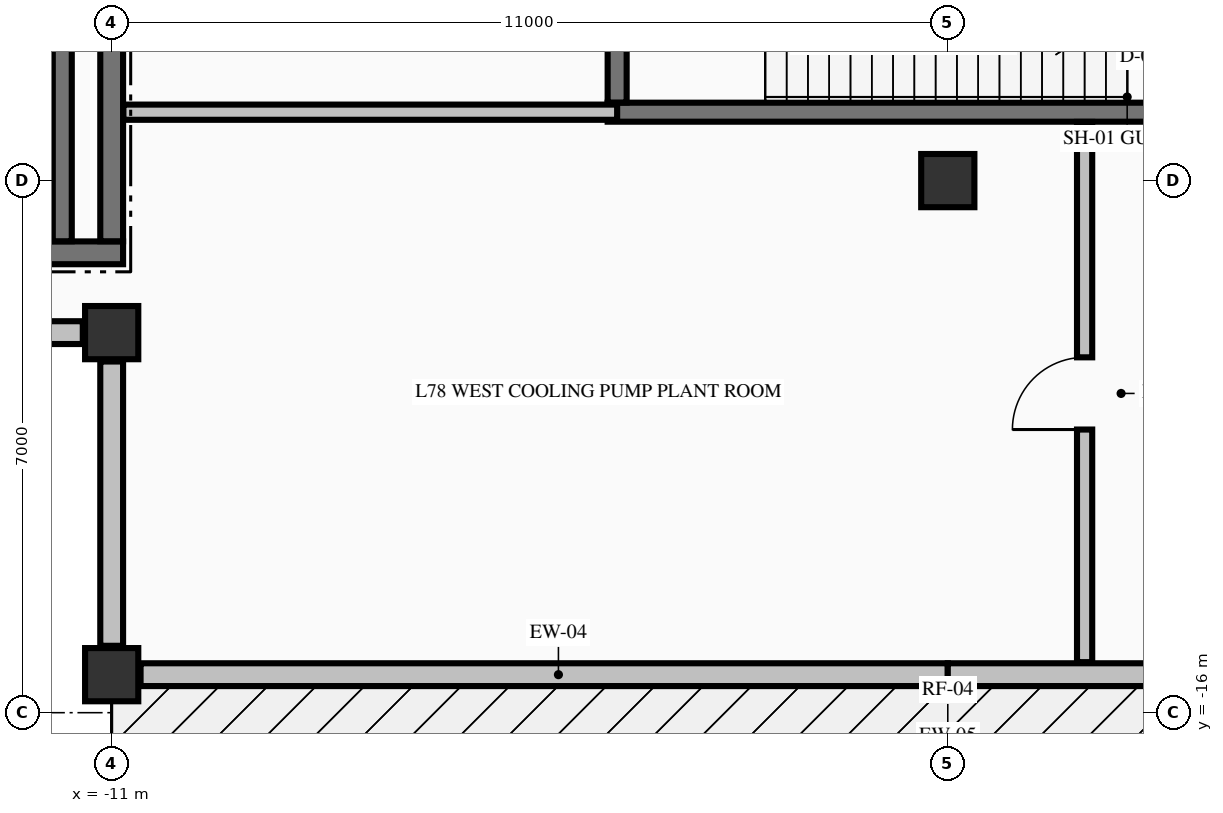
"""IFC4 building model, lengths in metres.
Left out: names, types, materials, properties, quantities, classifications, styles, units other than length and angle.
Written with IfcOpenShell. Run it as: python <this file> out.ifc"""

import sys

from ifc_helpers import new_model, si_unit, direction, frame, frame_2d, origin, origin_2d, place, context, subcontext, project, spatial, rectangle, extrude, element, fill, save


model = new_model("IFC4")
c1 = context("Model", 3, precision=1e-05, world=origin(), true_north=direction((0.0, 1.0)))
c2 = subcontext(c1, "Body", "Model", "MODEL_VIEW")
j1 = project(units=[si_unit("LENGTHUNIT", "METRE"), si_unit("PLANEANGLEUNIT", "RADIAN")], contexts=[c1])
p1 = place(None, origin())
s1 = spatial("IfcSite", under=j1, at=p1, CompositionType="ELEMENT")
p2 = place(p1, origin())
s2 = spatial("IfcBuilding", under=s1, at=p2, CompositionType="ELEMENT")
p3 = place(p2, frame((0.0, 0.0, 290.98)))
s3 = spatial("IfcBuildingStorey", under=s2, at=p3, CompositionType="ELEMENT", Elevation=290.98)
for number, where, z_axis, x_axis in (
    (1, (-11.0, -15.5, -0.325), (0.0, 0.0, 1.0), (1.0, 0.0, 0.0)),
    (2, (-11.0, -11.0, -0.325), (0.0, 0.0, 1.0), (1.0, 0.0, 0.0)),
    (3, (0.0, -9.0, -0.325), (0.0, 0.0, 1.0), (1.0, 0.0, 0.0)),
):
    element("IfcColumn", number, at=place(p3, frame(where, z_axis=z_axis, x_axis=x_axis)), inside=s3, PredefinedType="COLUMN", context=c2, shape_type="SweptSolid", body=[
        extrude(rectangle(XDim=0.7, YDim=0.7, at=origin_2d()), origin(), (0.0, 0.0, 1.0), 3.06),
    ])
for number, where, z_axis, x_axis in (
    (4, (-10.62, -15.5, 0.0), (0.0, 0.0, 1.0), (1.0, 0.0, 0.0)),
    (5, (0.0, -15.5, 0.0), (0.0, 0.0, 1.0), (1.0, 0.0, 0.0)),
):
    element("IfcWall", number, at=place(p3, frame(where, z_axis=z_axis, x_axis=x_axis)), inside=s3, PredefinedType="STANDARD", context=c2, shape_type="SweptSolid", body=[
        extrude(rectangle(XDim=10.62, YDim=0.3, at=frame_2d((5.31, 0.0))), origin(), (0.0, 0.0, 1.0), 2.127),
    ])
p4 = place(p3, frame((-15.12, -11.0, 0.0), z_axis=(0.0, 0.0, 1.0), x_axis=(1.0, 0.0, 0.0)))
e6 = element("IfcWall", 6, at=p4, inside=s3, PredefinedType="STANDARD", context=c2, shape_type="SweptSolid", body=[
    extrude(rectangle(XDim=3.74, YDim=0.3, at=frame_2d((1.87, 0.0))), origin(), (0.0, 0.0, 1.0), 1.077),
])
p5 = place(p3, frame((-11.0, -11.38, 0.0), z_axis=(0.0, 0.0, 1.0), x_axis=(0.0, -1.0, 0.0)))
e7 = element("IfcWall", 7, at=p5, inside=s3, PredefinedType="STANDARD", context=c2, shape_type="SweptSolid", body=[
    extrude(rectangle(XDim=3.74, YDim=0.3, at=frame_2d((1.87, 0.0))), origin(), (0.0, 0.0, 1.0), 0.927),
])
p6 = place(p3, frame((-14.85, -9.95, 0.0), z_axis=(0.0, 0.0, 1.0), x_axis=(1.0, 0.0, 0.0)))
e8 = element("IfcWall", 8, at=p6, inside=s3, PredefinedType="SHEAR", context=c2, shape_type="SweptSolid", body=[
    extrude(rectangle(XDim=4.0, YDim=0.3, at=frame_2d((2.0, 0.0))), origin(), (0.0, 0.0, 1.0), 2.735),
])
p7 = place(p3, frame((-4.475, -8.1, 0.0), z_axis=(0.0, 0.0, 1.0), x_axis=(1.0, 0.0, 0.0)))
e9 = element("IfcWall", 9, at=p7, inside=s3, PredefinedType="SOLIDWALL", context=c2, shape_type="SweptSolid", body=[
    extrude(rectangle(XDim=8.75, YDim=0.25, at=frame_2d((4.375, 0.0))), origin(), (0.0, 0.0, 1.0), 2.735),
])
p8 = place(p3, frame((-10.847, -8.1, 0.0), z_axis=(0.0, 0.0, 1.0), x_axis=(1.0, 0.0, 0.0)))
e10 = element("IfcWall", 10, at=p8, inside=s3, PredefinedType="PARTITIONING", context=c2, shape_type="SweptSolid", body=[
    extrude(rectangle(XDim=6.497, YDim=0.2, at=frame_2d((3.249, 0.0))), origin(), (0.0, 0.0, 1.0), 2.735),
])
p9 = place(p3, frame((-11.65, -9.798, 0.0), z_axis=(0.0, 0.0, 1.0), x_axis=(0.0, 1.0, 0.0)))
e11 = element("IfcWall", 11, at=p9, inside=s3, PredefinedType="SOLIDWALL", context=c2, shape_type="SweptSolid", body=[
    extrude(rectangle(XDim=9.396, YDim=0.25, at=frame_2d((4.698, 0.0))), origin(), (0.0, 0.0, 1.0), 2.735),
])
p10 = place(p3, frame((-11.0, -9.798, 0.0), z_axis=(0.0, 0.0, 1.0), x_axis=(0.0, 1.0, 0.0)))
e12 = element("IfcWall", 12, at=p10, inside=s3, PredefinedType="SHEAR", context=c2, shape_type="SweptSolid", body=[
    extrude(rectangle(XDim=9.444, YDim=0.3, at=frame_2d((4.722, 0.0))), origin(), (0.0, 0.0, 1.0), 2.735),
])
p11 = place(p3, frame((-4.35, -7.973, 0.0), z_axis=(0.0, 0.0, 1.0), x_axis=(0.0, 1.0, 0.0)))
e13 = element("IfcWall", 13, at=p11, inside=s3, PredefinedType="SOLIDWALL", context=c2, shape_type="SweptSolid", body=[
    extrude(rectangle(XDim=1.546, YDim=0.25, at=frame_2d((0.773, 0.0))), origin(), (0.0, 0.0, 1.0), 2.735),
])
p12 = place(p3, frame((1.8, -15.335, 0.0), z_axis=(0.0, 0.0, 1.0), x_axis=(0.0, 1.0, 0.0)))
e14 = element("IfcWall", 14, at=p12, inside=s3, PredefinedType="PARTITIONING", context=c2, shape_type="SweptSolid", body=[
    extrude(rectangle(XDim=7.107, YDim=0.2, at=frame_2d((3.553, 0.0))), origin(), (0.0, 0.0, 1.0), 2.735),
])
p13 = place(p12, frame((3.06, 0.0, 0.0)))
e15 = element("IfcOpeningElement", 15, at=p13, cuts=e14, PredefinedType="OPENING", context=c2, shape_type="SweptSolid", body=[
    extrude(rectangle(XDim=0.95, YDim=2.15, at=frame_2d((0.475, 1.075))), frame((0.0, 0.11, 0.0), z_axis=(0.0, -1.0, 0.0), x_axis=(1.0, 0.0, 0.0)), (0.0, 0.0, 1.0), 0.22),
])
p14 = place(p13, origin())
e16 = element("IfcDoor", 16, at=p14, inside=s3, OperationType="SINGLE_SWING_LEFT", PredefinedType="DOOR", context=c2, shape_type="SweptSolid", body=[
    extrude(rectangle(XDim=0.95, YDim=2.15, at=frame_2d((0.475, 1.075))), frame((0.0, 0.025, 0.0), z_axis=(0.0, -1.0, 0.0), x_axis=(1.0, 0.0, 0.0)), (0.0, 0.0, 1.0), 0.05),
])
fill(e15, e16)
save(model, sys.argv[1])
